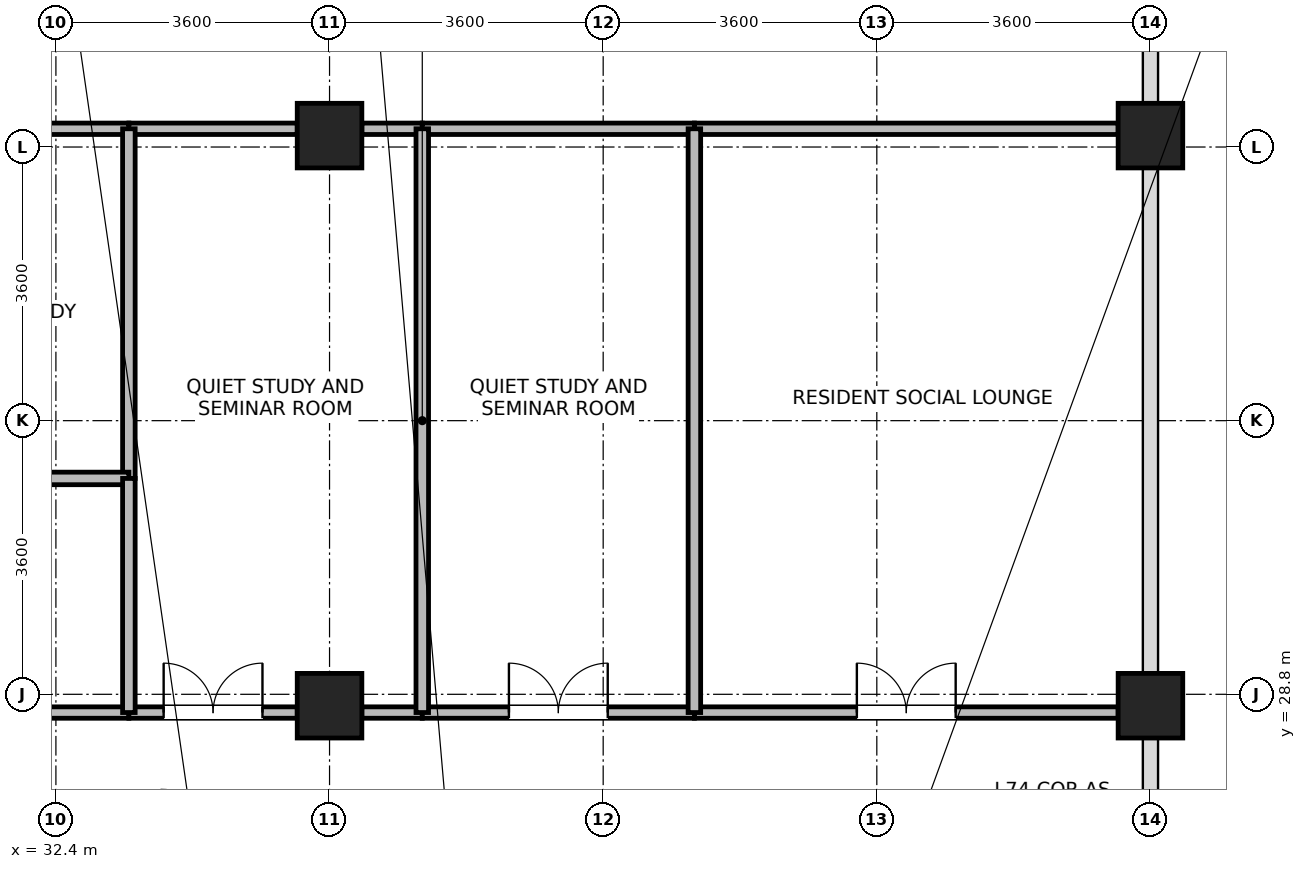
"""IFC4 building model, lengths in metres.
Left out: names, types, materials, properties, quantities, classifications, styles, units other than length and angle.
Written with IfcOpenShell. Run it as: python <this file> out.ifc"""

import sys

from ifc_helpers import new_model, si_unit, direction, frame, frame_2d, origin, origin_2d, place, context, subcontext, project, spatial, rectangle, extrude, source, transform, mapped, element, fill, save


model = new_model("IFC4")
c1 = context("Model", 3, precision=1e-05, world=origin(), true_north=direction((0.0, 1.0)))
c2 = subcontext(c1, "Body", "Model", "MODEL_VIEW")
j1 = project(units=[si_unit("LENGTHUNIT", "METRE"), si_unit("PLANEANGLEUNIT", "RADIAN")], contexts=[c1])
p1 = place(None, origin())
s1 = spatial("IfcSite", under=j1, at=p1, CompositionType="ELEMENT")
p2 = place(p1, origin())
s2 = spatial("IfcBuilding", under=s1, at=p2, CompositionType="ELEMENT")
p3 = place(p2, frame((0.0, 0.0, 286.9)))
s3 = spatial("IfcBuildingStorey", under=s2, at=p3, CompositionType="ELEMENT", Elevation=286.9)
m1 = source(origin(), c2, "Body", "SweptSolid", [
    extrude(rectangle(XDim=0.85, YDim=0.85, at=origin_2d()), origin(), (0.0, 0.0, 1.0), 3.7),
])
for number, where, z_axis, x_axis in (
    (1, (36.0, 28.65, 0.0), (0.0, 0.0, 1.0), (1.0, 0.0, 0.0)),
    (2, (36.0, 36.15, 0.0), (0.0, 0.0, 1.0), (1.0, 0.0, 0.0)),
    (3, (46.8, 28.65, 0.0), (0.0, 0.0, 1.0), (1.0, 0.0, 0.0)),
    (4, (46.8, 36.15, 0.0), (0.0, 0.0, 1.0), (1.0, 0.0, 0.0)),
):
    element("IfcColumn", number, at=place(p3, frame(where, z_axis=z_axis, x_axis=x_axis)), inside=s3, PredefinedType="COLUMN", context=c2, shape_type="MappedRepresentation", body=[
        mapped(m1, transform((0.0, 0.0, 0.0), x_axis=(1.0, 0.0, 0.0), y_axis=(0.0, 1.0, 0.0), z_axis=(0.0, 0.0, 1.0), scale=1.0)),
    ])
p4 = place(p3, frame((40.8, 28.56, 0.0), z_axis=(0.0, 0.0, 1.0), x_axis=(1.0, 0.0, 0.0)))
e5 = element("IfcWall", 5, at=p4, inside=s3, PredefinedType="PARTITIONING", context=c2, shape_type="SweptSolid", body=[
    extrude(rectangle(XDim=5.575, YDim=0.15, at=frame_2d((2.788, 0.0))), origin(), (0.0, 0.0, 1.0), 2.905),
])
p5 = place(p4, frame((2.137, 0.0, 0.0)))
e6 = element("IfcOpeningElement", 6, at=p5, cuts=e5, PredefinedType="OPENING", context=c2, shape_type="SweptSolid", body=[
    extrude(rectangle(XDim=1.3, YDim=2.12, at=frame_2d((0.65, 1.06))), frame((0.0, 0.085, 0.0), z_axis=(0.0, -1.0, 0.0), x_axis=(1.0, 0.0, 0.0)), (0.0, 0.0, 1.0), 0.17),
])
p6 = place(p3, frame((40.8, 36.24, 0.0), z_axis=(0.0, 0.0, 1.0), x_axis=(1.0, 0.0, 0.0)))
e7 = element("IfcWall", 7, at=p6, inside=s3, PredefinedType="PARTITIONING", context=c2, shape_type="SweptSolid", body=[
    extrude(rectangle(XDim=5.575, YDim=0.15, at=frame_2d((2.788, 0.0))), origin(), (0.0, 0.0, 1.0), 2.905),
])
p7 = place(p3, frame((29.225, 28.56, 0.0), z_axis=(0.0, 0.0, 1.0), x_axis=(1.0, 0.0, 0.0)))
e8 = element("IfcWall", 8, at=p7, inside=s3, PredefinedType="PARTITIONING", context=c2, shape_type="SweptSolid", body=[
    extrude(rectangle(XDim=4.135, YDim=0.15, at=frame_2d((2.067, 0.0))), origin(), (0.0, 0.0, 1.0), 2.905),
])
p8 = place(p7, frame((1.637, 0.0, 0.0)))
e9 = element("IfcOpeningElement", 9, at=p8, cuts=e8, PredefinedType="OPENING", context=c2, shape_type="SweptSolid", body=[
    extrude(rectangle(XDim=0.86, YDim=2.02, at=frame_2d((0.43, 1.01))), frame((0.0, 0.085, 0.0), z_axis=(0.0, -1.0, 0.0), x_axis=(1.0, 0.0, 0.0)), (0.0, 0.0, 1.0), 0.17),
])
p9 = place(p3, frame((29.225, 36.24, 0.0), z_axis=(0.0, 0.0, 1.0), x_axis=(1.0, 0.0, 0.0)))
e10 = element("IfcWall", 10, at=p9, inside=s3, PredefinedType="PARTITIONING", context=c2, shape_type="SweptSolid", body=[
    extrude(rectangle(XDim=4.135, YDim=0.15, at=frame_2d((2.067, 0.0))), origin(), (0.0, 0.0, 1.0), 2.905),
])
p10 = place(p9, frame((1.417, 0.0, 0.0)))
e11 = element("IfcOpeningElement", 11, at=p10, cuts=e10, PredefinedType="OPENING", context=c2, shape_type="SweptSolid", body=[
    extrude(rectangle(XDim=1.3, YDim=2.12, at=frame_2d((0.65, 1.06))), frame((0.0, 0.085, 0.0), z_axis=(0.0, -1.0, 0.0), x_axis=(1.0, 0.0, 0.0)), (0.0, 0.0, 1.0), 0.17),
])
p11 = place(p3, frame((33.36, 28.56, 0.0), z_axis=(0.0, 0.0, 1.0), x_axis=(1.0, 0.0, 0.0)))
e12 = element("IfcWall", 12, at=p11, inside=s3, PredefinedType="PARTITIONING", context=c2, shape_type="SweptSolid", body=[
    extrude(rectangle(XDim=2.215, YDim=0.15, at=frame_2d((1.107, 0.0))), origin(), (0.0, 0.0, 1.0), 2.905),
])
p12 = place(p11, frame((0.458, 0.0, 0.0)))
e13 = element("IfcOpeningElement", 13, at=p12, cuts=e12, PredefinedType="OPENING", context=c2, shape_type="SweptSolid", body=[
    extrude(rectangle(XDim=1.3, YDim=2.12, at=frame_2d((0.65, 1.06))), frame((0.0, 0.085, 0.0), z_axis=(0.0, -1.0, 0.0), x_axis=(1.0, 0.0, 0.0)), (0.0, 0.0, 1.0), 0.17),
])
p13 = place(p3, frame((36.425, 28.56, 0.0), z_axis=(0.0, 0.0, 1.0), x_axis=(1.0, 0.0, 0.0)))
e14 = element("IfcWall", 14, at=p13, inside=s3, PredefinedType="PARTITIONING", context=c2, shape_type="SweptSolid", body=[
    extrude(rectangle(XDim=0.795, YDim=0.15, at=frame_2d((0.397, 0.0))), origin(), (0.0, 0.0, 1.0), 2.905),
])
p14 = place(p3, frame((33.36, 36.24, 0.0), z_axis=(0.0, 0.0, 1.0), x_axis=(1.0, 0.0, 0.0)))
e15 = element("IfcWall", 15, at=p14, inside=s3, PredefinedType="PARTITIONING", context=c2, shape_type="SweptSolid", body=[
    extrude(rectangle(XDim=2.215, YDim=0.15, at=frame_2d((1.107, 0.0))), origin(), (0.0, 0.0, 1.0), 2.905),
])
p15 = place(p3, frame((36.425, 36.24, 0.0), z_axis=(0.0, 0.0, 1.0), x_axis=(1.0, 0.0, 0.0)))
e16 = element("IfcWall", 16, at=p15, inside=s3, PredefinedType="PARTITIONING", context=c2, shape_type="SweptSolid", body=[
    extrude(rectangle(XDim=0.795, YDim=0.15, at=frame_2d((0.397, 0.0))), origin(), (0.0, 0.0, 1.0), 2.905),
])
p16 = place(p3, frame((37.22, 28.56, 0.0), z_axis=(0.0, 0.0, 1.0), x_axis=(1.0, 0.0, 0.0)))
e17 = element("IfcWall", 17, at=p16, inside=s3, PredefinedType="PARTITIONING", context=c2, shape_type="SweptSolid", body=[
    extrude(rectangle(XDim=3.58, YDim=0.15, at=frame_2d((1.79, 0.0))), origin(), (0.0, 0.0, 1.0), 2.905),
])
p17 = place(p16, frame((1.14, 0.0, 0.0)))
e18 = element("IfcOpeningElement", 18, at=p17, cuts=e17, PredefinedType="OPENING", context=c2, shape_type="SweptSolid", body=[
    extrude(rectangle(XDim=1.3, YDim=2.12, at=frame_2d((0.65, 1.06))), frame((0.0, 0.085, 0.0), z_axis=(0.0, -1.0, 0.0), x_axis=(1.0, 0.0, 0.0)), (0.0, 0.0, 1.0), 0.17),
])
p18 = place(p3, frame((37.22, 36.24, 0.0), z_axis=(0.0, 0.0, 1.0), x_axis=(1.0, 0.0, 0.0)))
e19 = element("IfcWall", 19, at=p18, inside=s3, PredefinedType="PARTITIONING", context=c2, shape_type="SweptSolid", body=[
    extrude(rectangle(XDim=3.58, YDim=0.15, at=frame_2d((1.79, 0.0))), origin(), (0.0, 0.0, 1.0), 2.905),
])
for number, where, z_axis, x_axis in (
    (20, (37.22, 28.56, 0.0), (0.0, 0.0, 1.0), (0.0, 1.0, 0.0)),
    (21, (40.8, 28.56, 0.0), (0.0, 0.0, 1.0), (0.0, 1.0, 0.0)),
):
    element("IfcWall", number, at=place(p3, frame(where, z_axis=z_axis, x_axis=x_axis)), inside=s3, PredefinedType="PARTITIONING", context=c2, shape_type="SweptSolid", body=[
        extrude(rectangle(XDim=7.68, YDim=0.165, at=frame_2d((3.84, 0.0))), origin(), (0.0, 0.0, 1.0), 3.455),
    ])
p19 = place(p3, frame((33.36, 31.64, 0.0), z_axis=(0.0, 0.0, 1.0), x_axis=(0.0, 1.0, 0.0)))
e22 = element("IfcWall", 22, at=p19, inside=s3, PredefinedType="PARTITIONING", context=c2, shape_type="SweptSolid", body=[
    extrude(rectangle(XDim=4.6, YDim=0.165, at=frame_2d((2.3, 0.0))), origin(), (0.0, 0.0, 1.0), 3.455),
])
p20 = place(p3, frame((28.84, 31.64, 0.0), z_axis=(0.0, 0.0, 1.0), x_axis=(1.0, 0.0, 0.0)))
e23 = element("IfcWall", 23, at=p20, inside=s3, PredefinedType="PARTITIONING", context=c2, shape_type="SweptSolid", body=[
    extrude(rectangle(XDim=4.52, YDim=0.165, at=frame_2d((2.26, 0.0))), origin(), (0.0, 0.0, 1.0), 3.455),
])
p21 = place(p3, frame((33.36, 28.56, 0.0), z_axis=(0.0, 0.0, 1.0), x_axis=(0.0, 1.0, 0.0)))
e24 = element("IfcWall", 24, at=p21, inside=s3, PredefinedType="PARTITIONING", context=c2, shape_type="SweptSolid", body=[
    extrude(rectangle(XDim=3.08, YDim=0.165, at=frame_2d((1.54, 0.0))), origin(), (0.0, 0.0, 1.0), 3.455),
])
p22 = place(p5, origin())
e25 = element("IfcDoor", 25, at=p22, inside=s3, OperationType="DOUBLE_DOOR_SINGLE_SWING", PredefinedType="DOOR", context=c2, shape_type="SweptSolid", body=[
    extrude(rectangle(XDim=1.3, YDim=2.12, at=frame_2d((0.65, 1.06))), frame((0.0, 0.025, 0.0), z_axis=(0.0, -1.0, 0.0), x_axis=(1.0, 0.0, 0.0)), (0.0, 0.0, 1.0), 0.05),
])
fill(e6, e25)
p23 = place(p12, origin())
e26 = element("IfcDoor", 26, at=p23, inside=s3, OperationType="DOUBLE_DOOR_SINGLE_SWING", PredefinedType="DOOR", context=c2, shape_type="SweptSolid", body=[
    extrude(rectangle(XDim=1.3, YDim=2.12, at=frame_2d((0.65, 1.06))), frame((0.0, 0.025, 0.0), z_axis=(0.0, -1.0, 0.0), x_axis=(1.0, 0.0, 0.0)), (0.0, 0.0, 1.0), 0.05),
])
fill(e13, e26)
p24 = place(p17, origin())
e27 = element("IfcDoor", 27, at=p24, inside=s3, OperationType="DOUBLE_DOOR_SINGLE_SWING", PredefinedType="DOOR", context=c2, shape_type="SweptSolid", body=[
    extrude(rectangle(XDim=1.3, YDim=2.12, at=frame_2d((0.65, 1.06))), frame((0.0, 0.025, 0.0), z_axis=(0.0, -1.0, 0.0), x_axis=(1.0, 0.0, 0.0)), (0.0, 0.0, 1.0), 0.05),
])
fill(e18, e27)
save(model, sys.argv[1])
